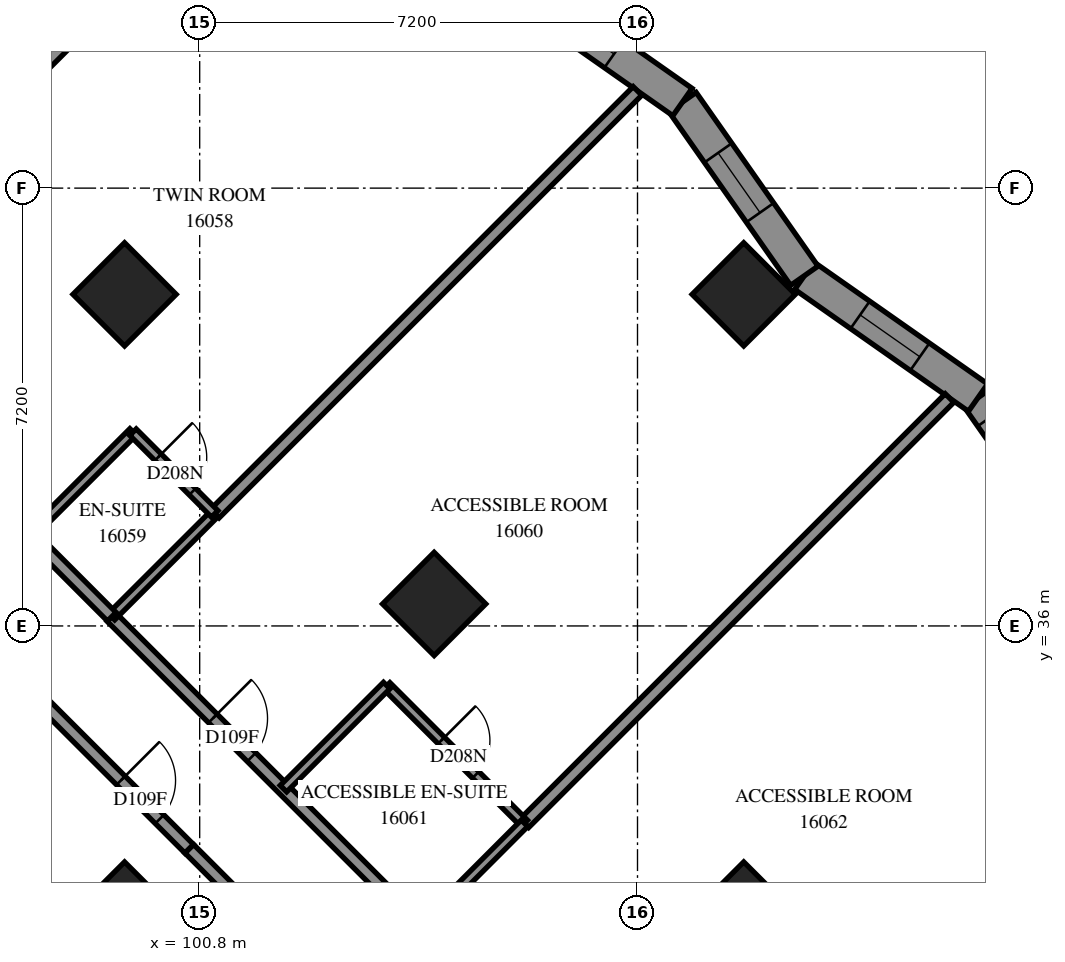
"""IFC4 building model, lengths in metres.
Left out: names, types, materials, properties, quantities, classifications, styles, units other than length and angle.
Written with IfcOpenShell. Run it as: python <this file> out.ifc"""

import sys

from ifc_helpers import new_model, si_unit, direction, frame, frame_2d, origin, origin_2d, place, context, subcontext, project, spatial, polyline, rectangle, outline, extrude, element, fill, save


model = new_model("IFC4")
c1 = context("Model", 3, precision=1e-05, world=origin(), true_north=direction((0.0, 1.0)))
c2 = subcontext(c1, "Body", "Model", "MODEL_VIEW")
j1 = project(units=[si_unit("LENGTHUNIT", "METRE"), si_unit("PLANEANGLEUNIT", "RADIAN")], contexts=[c1])
p1 = place(None, origin())
s1 = spatial("IfcSite", under=j1, at=p1, CompositionType="ELEMENT")
p2 = place(p1, origin())
s2 = spatial("IfcBuilding", under=s1, at=p2, CompositionType="ELEMENT")
p3 = place(p2, frame((0.0, 0.0, 61.0)))
s3 = spatial("IfcBuildingStorey", under=s2, at=p3, CompositionType="ELEMENT", Elevation=61.0)
for number, where, z_axis, x_axis in (
    (1, (99.565, 41.453, 0.0), (0.0, 0.0, 1.0), (0.707, -0.707, 0.0)),
    (2, (109.747, 41.453, 0.0), (0.0, 0.0, 1.0), (0.707, -0.707, 0.0)),
    (3, (104.656, 36.362, 0.0), (0.0, 0.0, 1.0), (0.707, -0.707, 0.0)),
    (4, (99.565, 31.271, 0.0), (0.0, 0.0, 1.0), (0.707, -0.707, 0.0)),
    (5, (109.747, 31.271, 0.0), (0.0, 0.0, 1.0), (0.707, -0.707, 0.0)),
):
    element("IfcColumn", number, at=place(p3, frame(where, z_axis=z_axis, x_axis=x_axis)), inside=s3, PredefinedType="COLUMN", context=c2, shape_type="SweptSolid", body=[
        extrude(rectangle(XDim=1.2, YDim=1.2, at=origin_2d()), origin(), (0.0, 0.0, 1.0), 3.1),
    ])
p4 = place(p3, frame((115.618, 36.879, 0.0), z_axis=(0.0, 0.0, 1.0), x_axis=(-0.5742892267, 0.8186524807, 0.0)))
e6 = element("IfcWall", 6, at=p4, inside=s3, PredefinedType="SOLIDWALL", context=c2, shape_type="SweptSolid", body=[
    extrude(outline(polyline([(0.072, -0.275), (3.561, -0.275), (3.465, 0.275), (-0.072, 0.275), (0.072, -0.275)])), origin(), (0.0, 0.0, 1.0), 3.1),
])
p5 = place(p4, frame((0.333, 0.0, 0.5)))
e7 = element("IfcOpeningElement", 7, at=p5, cuts=e6, PredefinedType="OPENING", context=c2, shape_type="SweptSolid", body=[
    extrude(rectangle(XDim=2.8, YDim=2.45, at=frame_2d((1.4, 1.225))), frame((0.0, 0.285, 0.0), z_axis=(0.0, -1.0, 0.0), x_axis=(1.0, 0.0, 0.0)), (0.0, 0.0, 1.0), 0.57),
])
p6 = place(p3, frame((113.6, 39.755, 0.0), z_axis=(0.0, 0.0, 1.0), x_axis=(-0.8186472188, 0.5742967275, 0.0)))
e8 = element("IfcWall", 8, at=p6, inside=s3, PredefinedType="SOLIDWALL", context=c2, shape_type="SweptSolid", body=[
    extrude(outline(polyline([(-0.048, -0.275), (3.442, -0.275), (3.538, 0.275), (0.048, 0.275), (-0.048, -0.275)])), origin(), (0.0, 0.0, 1.0), 3.1),
])
p7 = place(p6, frame((1.169, 0.0, 0.5)))
e9 = element("IfcOpeningElement", 9, at=p7, cuts=e8, PredefinedType="OPENING", context=c2, shape_type="SweptSolid", body=[
    extrude(rectangle(XDim=1.2, YDim=2.45, at=frame_2d((0.6, 1.225))), frame((0.0, 0.285, 0.0), z_axis=(0.0, -1.0, 0.0), x_axis=(1.0, 0.0, 0.0)), (0.0, 0.0, 1.0), 0.57),
])
p8 = place(p3, frame((110.743, 41.759, 0.0), z_axis=(0.0, 0.0, 1.0), x_axis=(-0.5742832552, 0.8186566697, 0.0)))
e10 = element("IfcWall", 10, at=p8, inside=s3, PredefinedType="SOLIDWALL", context=c2, shape_type="SweptSolid", body=[
    extrude(outline(polyline([(0.048, -0.275), (3.538, -0.275), (3.442, 0.275), (-0.048, 0.275), (0.048, -0.275)])), origin(), (0.0, 0.0, 1.0), 3.1),
])
p9 = place(p8, frame((1.269, 0.0, 0.5)))
e11 = element("IfcOpeningElement", 11, at=p9, cuts=e10, PredefinedType="OPENING", context=c2, shape_type="SweptSolid", body=[
    extrude(rectangle(XDim=1.2, YDim=2.45, at=frame_2d((0.6, 1.225))), frame((0.0, 0.285, 0.0), z_axis=(0.0, -1.0, 0.0), x_axis=(1.0, 0.0, 0.0)), (0.0, 0.0, 1.0), 0.57),
])
p10 = place(p3, frame((108.739, 44.616, 0.0), z_axis=(0.0, 0.0, 1.0), x_axis=(-0.8186701418, 0.5742640499, 0.0)))
e12 = element("IfcWall", 12, at=p10, inside=s3, PredefinedType="SOLIDWALL", context=c2, shape_type="SweptSolid", body=[
    extrude(outline(polyline([(-0.048, -0.275), (3.442, -0.275), (3.538, 0.275), (0.048, 0.275), (-0.048, -0.275)])), origin(), (0.0, 0.0, 1.0), 3.1),
])
p11 = place(p10, frame((1.375, 0.0, 0.5)))
e13 = element("IfcOpeningElement", 13, at=p11, cuts=e12, PredefinedType="OPENING", context=c2, shape_type="SweptSolid", body=[
    extrude(rectangle(XDim=1.2, YDim=2.45, at=frame_2d((0.6, 1.225))), frame((0.0, 0.285, 0.0), z_axis=(0.0, -1.0, 0.0), x_axis=(1.0, 0.0, 0.0)), (0.0, 0.0, 1.0), 0.57),
])
p12 = place(p3, frame((94.259, 41.243, 0.0), z_axis=(0.0, 0.0, 1.0), x_axis=(0.7070205168, 0.707193035, 0.0)))
e14 = element("IfcWall", 14, at=p12, inside=s3, PredefinedType="PARTITIONING", context=c2, shape_type="SweptSolid", body=[
    extrude(rectangle(XDim=12.173, YDim=0.2, at=frame_2d((6.086, 0.0))), origin(), (0.0, 0.0, 1.0), 3.1),
])
p13 = place(p3, frame((93.484, 42.02, 0.0), z_axis=(0.0, 0.0, 1.0), x_axis=(0.7071067812, 0.7071067812, 0.0)))
e15 = element("IfcWall", 15, at=p13, inside=s3, PredefinedType="PARTITIONING", context=c2, shape_type="SweptSolid", body=[
    extrude(rectangle(XDim=9.998, YDim=0.2, at=frame_2d((4.999, 0.0))), origin(), (0.0, 0.0, 1.0), 3.1),
])
p14 = place(p13, frame((0.148, 0.0, 0.0)))
e16 = element("IfcOpeningElement", 16, at=p14, cuts=e15, PredefinedType="OPENING", context=c2, shape_type="SweptSolid", body=[
    extrude(rectangle(XDim=1.0, YDim=2.1, at=frame_2d((0.5, 1.05))), frame((0.0, 0.11, 0.0), z_axis=(0.0, -1.0, 0.0), x_axis=(1.0, 0.0, 0.0)), (0.0, 0.0, 1.0), 0.22),
])
p15 = place(p3, frame((106.14, 32.756, 0.0), z_axis=(0.0, 0.0, 1.0), x_axis=(0.7071017243, 0.707111838, 0.0)))
e17 = element("IfcWall", 17, at=p15, inside=s3, PredefinedType="PARTITIONING", context=c2, shape_type="SweptSolid", body=[
    extrude(rectangle(XDim=9.887, YDim=0.2, at=frame_2d((4.944, 0.0))), origin(), (0.0, 0.0, 1.0), 3.1),
])
p16 = place(p3, frame((101.049, 37.847, 0.0), z_axis=(0.0, 0.0, 1.0), x_axis=(0.7071067812, 0.7071067812, 0.0)))
e18 = element("IfcWall", 18, at=p16, inside=s3, PredefinedType="PARTITIONING", context=c2, shape_type="SweptSolid", body=[
    extrude(rectangle(XDim=9.831, YDim=0.2, at=frame_2d((4.915, 0.0))), origin(), (0.0, 0.0, 1.0), 3.1),
])
p17 = place(p3, frame((99.349, 36.147, 0.0), z_axis=(0.0, 0.0, 1.0), x_axis=(0.7071067812, -0.7071067812, 0.0)))
e19 = element("IfcWall", 19, at=p17, inside=s3, PredefinedType="PARTITIONING", context=c2, shape_type="SweptSolid", body=[
    extrude(rectangle(XDim=7.201, YDim=0.2, at=frame_2d((3.601, 0.0))), origin(), (0.0, 0.0, 1.0), 3.1),
])
p18 = place(p17, frame((2.358, 0.0, 0.0)))
e20 = element("IfcOpeningElement", 20, at=p18, cuts=e19, PredefinedType="OPENING", context=c2, shape_type="SweptSolid", body=[
    extrude(rectangle(XDim=0.9, YDim=2.1, at=frame_2d((0.45, 1.05))), frame((0.0, 0.11, 0.0), z_axis=(0.0, -1.0, 0.0), x_axis=(1.0, 0.0, 0.0)), (0.0, 0.0, 1.0), 0.22),
])
p19 = place(p3, frame((98.082, 34.879, 0.0), z_axis=(0.0, 0.0, 1.0), x_axis=(0.7073845681, -0.7068288851, 0.0)))
e21 = element("IfcWall", 21, at=p19, inside=s3, PredefinedType="PARTITIONING", context=c2, shape_type="SweptSolid", body=[
    extrude(rectangle(XDim=3.599, YDim=0.2, at=frame_2d((1.8, 0.0))), origin(), (0.0, 0.0, 1.0), 3.1),
])
p20 = place(p19, frame((2.009, 0.0, 0.0)))
e22 = element("IfcOpeningElement", 22, at=p20, cuts=e21, PredefinedType="OPENING", context=c2, shape_type="SweptSolid", body=[
    extrude(rectangle(XDim=0.9, YDim=2.1, at=frame_2d((0.45, 1.05))), frame((0.0, 0.11, 0.0), z_axis=(0.0, -1.0, 0.0), x_axis=(1.0, 0.0, 0.0)), (0.0, 0.0, 1.0), 0.22),
])
p21 = place(p3, frame((103.875, 35.015, 0.0), z_axis=(0.0, 0.0, 1.0), x_axis=(0.7071067812, -0.7071067812, 0.0)))
e23 = element("IfcWall", 23, at=p21, inside=s3, PredefinedType="PARTITIONING", context=c2, shape_type="SweptSolid", body=[
    extrude(rectangle(XDim=3.199, YDim=0.15, at=frame_2d((1.599, 0.0))), origin(), (0.0, 0.0, 1.0), 3.1),
])
p22 = place(p21, frame((1.27, 0.0, 0.0)))
e24 = element("IfcOpeningElement", 24, at=p22, cuts=e23, PredefinedType="OPENING", context=c2, shape_type="SweptSolid", body=[
    extrude(rectangle(XDim=0.8, YDim=2.1, at=frame_2d((0.4, 1.05))), frame((0.0, 0.085, 0.0), z_axis=(0.0, -1.0, 0.0), x_axis=(1.0, 0.0, 0.0)), (0.0, 0.0, 1.0), 0.17),
])
for number, where, z_axis, x_axis in (
    (25, (99.349, 36.153, 0.0), (0.0, 0.0, 1.0), (0.708, 0.707, 0.0)),
    (26, (104.445, 31.057, 0.0), (0.0, 0.0, 1.0), (0.707, 0.708, 0.0)),
    (27, (102.177, 33.325, 0.0), (0.0, 0.0, 1.0), (0.708, 0.707, 0.0)),
):
    element("IfcWall", number, at=place(p3, frame(where, z_axis=z_axis, x_axis=x_axis)), inside=s3, PredefinedType="PARTITIONING", context=c2, shape_type="SweptSolid", body=[
        extrude(rectangle(XDim=2.4, YDim=0.15, at=frame_2d((1.2, 0.0))), origin(), (0.0, 0.0, 1.0), 3.1),
    ])
p23 = place(p3, frame((98.009, 37.495, 0.0), z_axis=(0.0, 0.0, 1.0), x_axis=(0.7071067812, 0.7071067812, 0.0)))
e28 = element("IfcWall", 28, at=p23, inside=s3, PredefinedType="PARTITIONING", context=c2, shape_type="SweptSolid", body=[
    extrude(rectangle(XDim=2.398, YDim=0.15, at=frame_2d((1.199, 0.0))), origin(), (0.0, 0.0, 1.0), 3.1),
])
p24 = place(p3, frame((99.703, 39.187, 0.0), z_axis=(0.0, 0.0, 1.0), x_axis=(0.7071067812, -0.7071067812, 0.0)))
e29 = element("IfcWall", 29, at=p24, inside=s3, PredefinedType="PARTITIONING", context=c2, shape_type="SweptSolid", body=[
    extrude(rectangle(XDim=1.901, YDim=0.15, at=frame_2d((0.95, 0.0))), origin(), (0.0, 0.0, 1.0), 3.1),
])
p25 = place(p24, frame((0.584, 0.0, 0.0)))
e30 = element("IfcOpeningElement", 30, at=p25, cuts=e29, PredefinedType="OPENING", context=c2, shape_type="SweptSolid", body=[
    extrude(rectangle(XDim=0.8, YDim=2.1, at=frame_2d((0.4, 1.05))), frame((0.0, 0.085, 0.0), z_axis=(0.0, -1.0, 0.0), x_axis=(1.0, 0.0, 0.0)), (0.0, 0.0, 1.0), 0.17),
])
p26 = place(p3, frame((98.012, 37.496, 0.0), z_axis=(0.0, 0.0, 1.0), x_axis=(0.7065800724, -0.7076330979, 0.0)))
e31 = element("IfcWall", 31, at=p26, inside=s3, PredefinedType="PARTITIONING", context=c2, shape_type="SweptSolid", body=[
    extrude(rectangle(XDim=1.899, YDim=0.2, at=frame_2d((0.95, 0.0))), origin(), (0.0, 0.0, 1.0), 3.1),
])
p27 = place(p3, frame((100.629, 32.335, 0.0), z_axis=(0.0, 0.0, 1.0), x_axis=(0.7071067812, -0.7071067812, 0.0)))
e32 = element("IfcWall", 32, at=p27, inside=s3, PredefinedType="PARTITIONING", context=c2, shape_type="SweptSolid", body=[
    extrude(rectangle(XDim=1.7, YDim=0.2, at=frame_2d((0.85, 0.0))), origin(), (0.0, 0.0, 1.0), 3.1),
])
p28 = place(p5, origin())
e33 = element("IfcWindow", 33, at=p28, inside=s3, PartitioningType="SINGLE_PANEL", PredefinedType="WINDOW", context=c2, shape_type="SweptSolid", body=[
    extrude(rectangle(XDim=2.8, YDim=2.45, at=frame_2d((1.4, 1.225))), frame((0.0, 0.155, 0.0), z_axis=(0.0, -1.0, 0.0), x_axis=(1.0, 0.0, 0.0)), (0.0, 0.0, 1.0), 0.06),
])
fill(e7, e33)
p29 = place(p7, origin())
e34 = element("IfcWindow", 34, at=p29, inside=s3, PartitioningType="SINGLE_PANEL", PredefinedType="WINDOW", context=c2, shape_type="SweptSolid", body=[
    extrude(rectangle(XDim=1.2, YDim=2.45, at=frame_2d((0.6, 1.225))), frame((0.0, 0.155, 0.0), z_axis=(0.0, -1.0, 0.0), x_axis=(1.0, 0.0, 0.0)), (0.0, 0.0, 1.0), 0.06),
])
fill(e9, e34)
p30 = place(p9, origin())
e35 = element("IfcWindow", 35, at=p30, inside=s3, PartitioningType="SINGLE_PANEL", PredefinedType="WINDOW", context=c2, shape_type="SweptSolid", body=[
    extrude(rectangle(XDim=1.2, YDim=2.45, at=frame_2d((0.6, 1.225))), frame((0.0, 0.155, 0.0), z_axis=(0.0, -1.0, 0.0), x_axis=(1.0, 0.0, 0.0)), (0.0, 0.0, 1.0), 0.06),
])
fill(e11, e35)
p31 = place(p11, origin())
e36 = element("IfcWindow", 36, at=p31, inside=s3, PartitioningType="SINGLE_PANEL", PredefinedType="WINDOW", context=c2, shape_type="SweptSolid", body=[
    extrude(rectangle(XDim=1.2, YDim=2.45, at=frame_2d((0.6, 1.225))), frame((0.0, 0.155, 0.0), z_axis=(0.0, -1.0, 0.0), x_axis=(1.0, 0.0, 0.0)), (0.0, 0.0, 1.0), 0.06),
])
fill(e13, e36)
p32 = place(p25, origin())
e37 = element("IfcDoor", 37, at=p32, inside=s3, OperationType="SINGLE_SWING_RIGHT", PredefinedType="DOOR", context=c2, shape_type="SweptSolid", body=[
    extrude(rectangle(XDim=0.8, YDim=2.1, at=frame_2d((0.4, 1.05))), frame((0.0, 0.025, 0.0), z_axis=(0.0, -1.0, 0.0), x_axis=(1.0, 0.0, 0.0)), (0.0, 0.0, 1.0), 0.05),
])
fill(e30, e37)
p33 = place(p18, origin())
e38 = element("IfcDoor", 38, at=p33, inside=s3, OperationType="SINGLE_SWING_RIGHT", PredefinedType="DOOR", context=c2, shape_type="SweptSolid", body=[
    extrude(rectangle(XDim=0.9, YDim=2.1, at=frame_2d((0.45, 1.05))), frame((0.0, 0.025, 0.0), z_axis=(0.0, -1.0, 0.0), x_axis=(1.0, 0.0, 0.0)), (0.0, 0.0, 1.0), 0.05),
])
fill(e20, e38)
p34 = place(p22, origin())
e39 = element("IfcDoor", 39, at=p34, inside=s3, OperationType="SINGLE_SWING_RIGHT", PredefinedType="DOOR", context=c2, shape_type="SweptSolid", body=[
    extrude(rectangle(XDim=0.8, YDim=2.1, at=frame_2d((0.4, 1.05))), frame((0.0, 0.025, 0.0), z_axis=(0.0, -1.0, 0.0), x_axis=(1.0, 0.0, 0.0)), (0.0, 0.0, 1.0), 0.05),
])
fill(e24, e39)
p35 = place(p20, origin())
e40 = element("IfcDoor", 40, at=p35, inside=s3, OperationType="SINGLE_SWING_LEFT", PredefinedType="DOOR", context=c2, shape_type="SweptSolid", body=[
    extrude(rectangle(XDim=0.9, YDim=2.1, at=frame_2d((0.45, 1.05))), frame((0.0, 0.025, 0.0), z_axis=(0.0, -1.0, 0.0), x_axis=(1.0, 0.0, 0.0)), (0.0, 0.0, 1.0), 0.05),
])
fill(e22, e40)
save(model, sys.argv[1])
